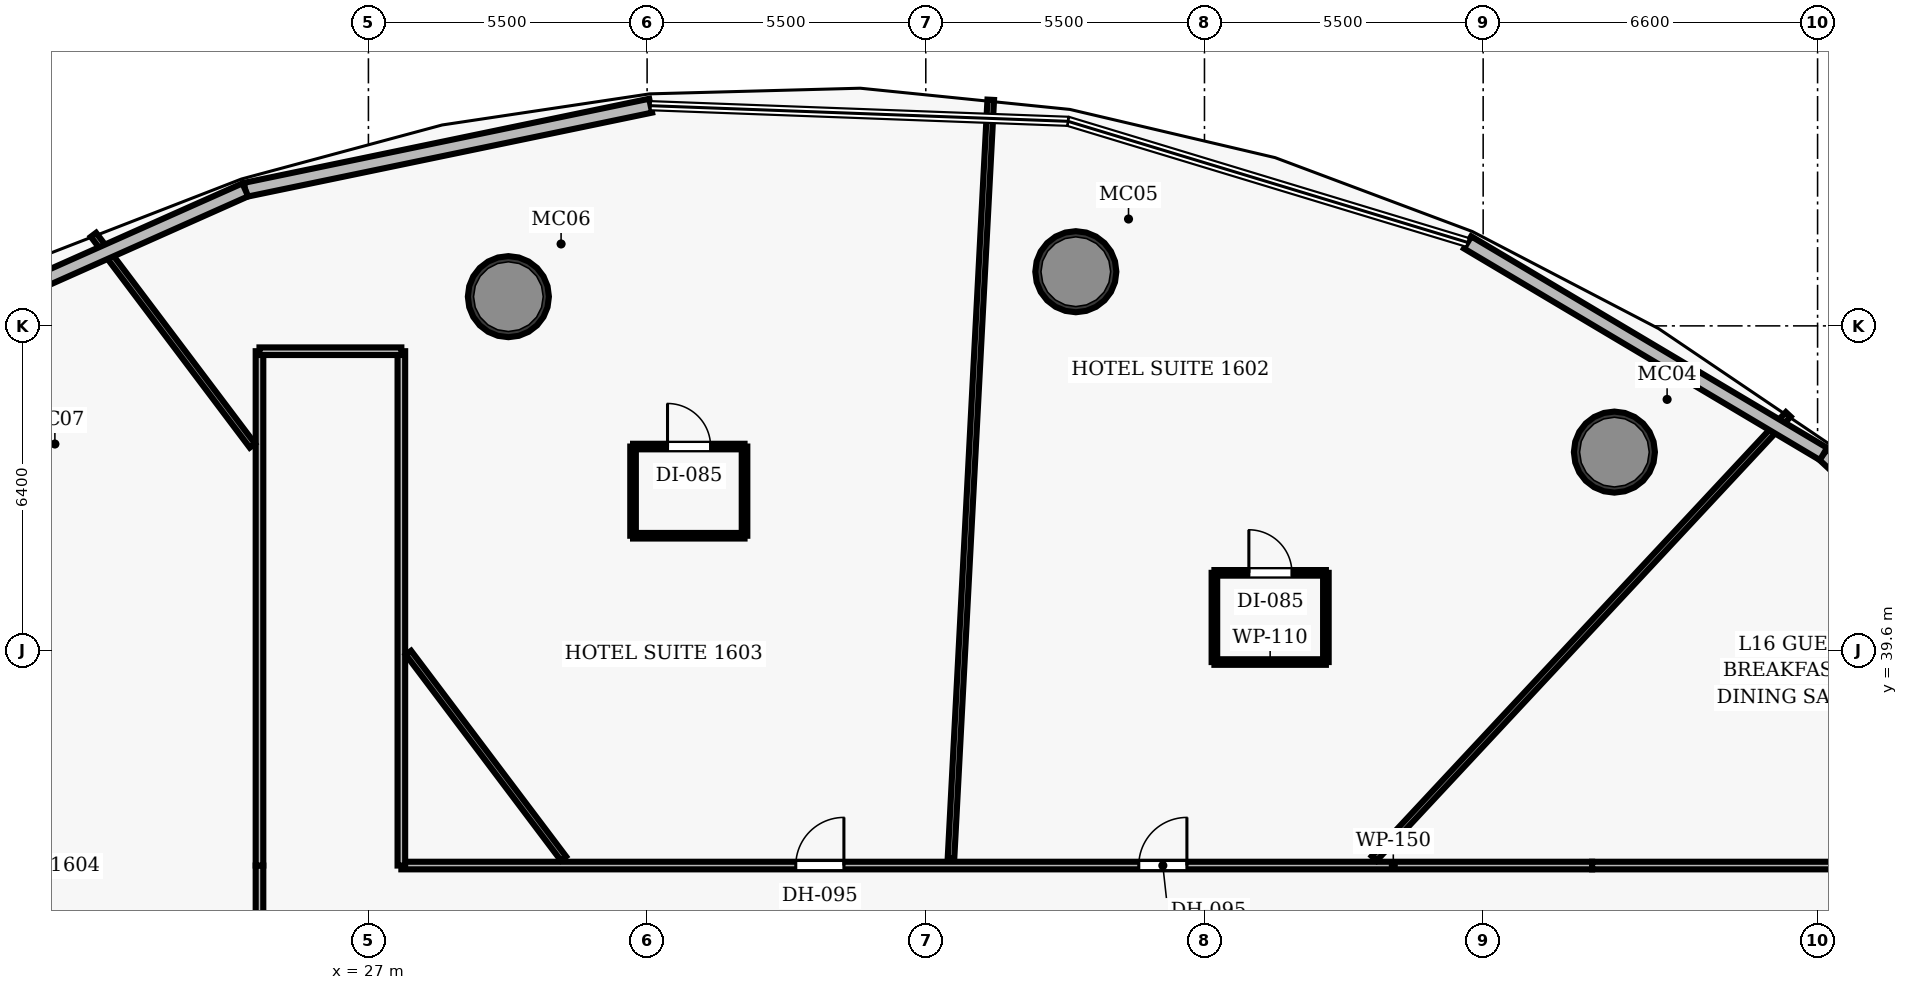
"""IFC4 building model, lengths in metres.
Left out: names, types, materials, properties, quantities, classifications, styles, units other than length and angle.
Written with IfcOpenShell. Run it as: python <this file> out.ifc"""

import sys

from ifc_helpers import new_model, si_unit, direction, frame, frame_2d, origin, origin_2d, place, context, subcontext, project, spatial, rectangle, hollow_circle, extrude, element, fill, save


model = new_model("IFC4")
c1 = context("Model", 3, precision=1e-05, world=origin(), true_north=direction((0.0, 1.0)))
c2 = subcontext(c1, "Body", "Model", "MODEL_VIEW")
j1 = project(units=[si_unit("LENGTHUNIT", "METRE"), si_unit("PLANEANGLEUNIT", "RADIAN")], contexts=[c1])
p1 = place(None, origin())
s1 = spatial("IfcSite", under=j1, at=p1, CompositionType="ELEMENT")
p2 = place(p1, origin())
s2 = spatial("IfcBuilding", under=s1, at=p2, CompositionType="ELEMENT")
p3 = place(p2, frame((0.0, 0.0, 72.9)))
s3 = spatial("IfcBuildingStorey", under=s2, at=p3, CompositionType="ELEMENT", Elevation=72.9)
for number, where, z_axis, x_axis in (
    (1, (51.59, 43.509, 0.0), (0.0, 0.0, 1.0), (1.0, 0.0, 0.0)),
    (2, (40.961, 47.069, 0.0), (0.0, 0.0, 1.0), (1.0, 0.0, 0.0)),
    (3, (29.762, 46.577, 0.0), (0.0, 0.0, 1.0), (1.0, 0.0, 0.0)),
):
    element("IfcColumn", number, at=place(p3, frame(where, z_axis=z_axis, x_axis=x_axis)), inside=s3, PredefinedType="COLUMN", context=c2, shape_type="SweptSolid", body=[
        extrude(hollow_circle(Radius=0.8, WallThickness=0.06, at=origin_2d()), origin(), (0.0, 0.0, 1.0), 3.5),
    ])
p4 = place(p3, frame((27.65, 35.35, 0.0), z_axis=(0.0, 0.0, 1.0), x_axis=(1.0, 0.0, 0.0)))
e4 = element("IfcWall", 4, at=p4, inside=s3, PredefinedType="PARTITIONING", context=c2, shape_type="SweptSolid", body=[
    extrude(rectangle(XDim=23.5, YDim=0.15, at=frame_2d((11.75, 0.0))), origin(), (0.0, 0.0, 1.0), 2.6),
])
p5 = place(p4, frame((14.553, 0.0, 0.0)))
e5 = element("IfcOpeningElement", 5, at=p5, cuts=e4, PredefinedType="OPENING", context=c2, shape_type="SweptSolid", body=[
    extrude(rectangle(XDim=0.95, YDim=2.15, at=frame_2d((0.475, 1.075))), frame((0.0, 0.085, 0.0), z_axis=(0.0, -1.0, 0.0), x_axis=(1.0, 0.0, 0.0)), (0.0, 0.0, 1.0), 0.17),
])
p6 = place(p4, frame((7.784, 0.0, 0.0)))
e6 = element("IfcOpeningElement", 6, at=p6, cuts=e4, PredefinedType="OPENING", context=c2, shape_type="SweptSolid", body=[
    extrude(rectangle(XDim=0.95, YDim=2.15, at=frame_2d((0.475, 1.075))), frame((0.0, 0.085, 0.0), z_axis=(0.0, -1.0, 0.0), x_axis=(1.0, 0.0, 0.0)), (0.0, 0.0, 1.0), 0.17),
])
p7 = place(p3, frame((24.85, 19.45, 0.0), z_axis=(0.0, 0.0, 1.0), x_axis=(0.0, 1.0, 0.0)))
e7 = element("IfcWall", 7, at=p7, inside=s3, PredefinedType="PARTITIONING", context=c2, shape_type="SweptSolid", body=[
    extrude(rectangle(XDim=15.9, YDim=0.15, at=frame_2d((7.95, 0.0))), origin(), (0.0, 0.0, 1.0), 2.6),
])
p8 = place(p7, frame((10.488, 0.0, 0.0)))
e8 = element("IfcOpeningElement", 8, at=p8, cuts=e7, PredefinedType="OPENING", context=c2, shape_type="SweptSolid", body=[
    extrude(rectangle(XDim=0.95, YDim=2.15, at=frame_2d((0.475, 1.075))), frame((0.0, 0.085, 0.0), z_axis=(0.0, -1.0, 0.0), x_axis=(1.0, 0.0, 0.0)), (0.0, 0.0, 1.0), 0.17),
])
p9 = place(p7, frame((6.958, 0.0, 0.0)))
e9 = element("IfcOpeningElement", 9, at=p9, cuts=e7, PredefinedType="OPENING", context=c2, shape_type="SweptSolid", body=[
    extrude(rectangle(XDim=0.95, YDim=2.15, at=frame_2d((0.475, 1.075))), frame((0.0, 0.085, 0.0), z_axis=(0.0, -1.0, 0.0), x_axis=(1.0, 0.0, 0.0)), (0.0, 0.0, 1.0), 0.17),
])
p10 = place(p3, frame((51.15, 35.35, 0.0), z_axis=(0.0, 0.0, 1.0), x_axis=(1.0, 0.0, 0.0)))
e10 = element("IfcWall", 10, at=p10, inside=s3, PredefinedType="PARTITIONING", context=c2, shape_type="SweptSolid", body=[
    extrude(rectangle(XDim=11.606, YDim=0.15, at=frame_2d((5.803, 0.0))), origin(), (0.0, 0.0, 1.0), 2.6),
])
for number, where, z_axis, x_axis in (
    (11, (24.85, 35.35, 0.0), (0.0, 0.0, 1.0), (0.0, 1.0, 0.0)),
    (12, (27.65, 35.35, 0.0), (0.0, 0.0, 1.0), (0.0, 1.0, 0.0)),
):
    element("IfcWall", number, at=place(p3, frame(where, z_axis=z_axis, x_axis=x_axis)), inside=s3, PredefinedType="PARTITIONING", context=c2, shape_type="SweptSolid", body=[
        extrude(rectangle(XDim=10.15, YDim=0.15, at=frame_2d((5.075, 0.0))), origin(), (0.0, 0.0, 1.0), 2.6),
    ])
p11 = place(p3, frame((24.85, 45.5, 0.0), z_axis=(0.0, 0.0, 1.0), x_axis=(1.0, 0.0, 0.0)))
e13 = element("IfcWall", 13, at=p11, inside=s3, PredefinedType="PARTITIONING", context=c2, shape_type="SweptSolid", body=[
    extrude(rectangle(XDim=2.8, YDim=0.15, at=frame_2d((1.4, 0.0))), origin(), (0.0, 0.0, 1.0), 2.6),
])
p12 = place(p3, frame((46.85, 35.49, 0.0), z_axis=(0.0, 0.0, 1.0), x_axis=(0.682000932275, 0.731351302983, 0.0)))
e14 = element("IfcWall", 14, at=p12, inside=s3, PredefinedType="PARTITIONING", context=c2, shape_type="SweptSolid", body=[
    extrude(rectangle(XDim=11.982, YDim=0.13, at=frame_2d((5.991, 0.0))), origin(), (0.0, 0.0, 1.0), 2.6),
])
p13 = place(p3, frame((38.497, 35.49, 0.0), z_axis=(0.0, 0.0, 1.0), x_axis=(0.052337465479, 0.998629455658, 0.0)))
e15 = element("IfcWall", 15, at=p13, inside=s3, PredefinedType="PARTITIONING", context=c2, shape_type="SweptSolid", body=[
    extrude(rectangle(XDim=14.992, YDim=0.13, at=frame_2d((7.496, 0.0))), origin(), (0.0, 0.0, 1.0), 2.6),
])
p14 = place(p3, frame((30.849, 35.49, 0.0), z_axis=(0.0, 0.0, 1.0), x_axis=(-0.601827595562, 0.798626035902, 0.0)))
e16 = element("IfcWall", 16, at=p14, inside=s3, PredefinedType="PARTITIONING", context=c2, shape_type="SweptSolid", body=[
    extrude(rectangle(XDim=5.083, YDim=0.13, at=frame_2d((2.541, 0.0))), origin(), (0.0, 0.0, 1.0), 2.6),
])
p15 = place(p3, frame((24.71, 43.636, 0.0), z_axis=(0.0, 0.0, 1.0), x_axis=(-0.601805197405, 0.798642914184, 0.0)))
e17 = element("IfcWall", 17, at=p15, inside=s3, PredefinedType="PARTITIONING", context=c2, shape_type="SweptSolid", body=[
    extrude(rectangle(XDim=5.21, YDim=0.13, at=frame_2d((2.605, 0.0))), origin(), (0.0, 0.0, 1.0), 2.6),
])
p16 = place(p3, frame((43.696, 39.366, 0.0), z_axis=(0.0, 0.0, 1.0), x_axis=(1.0, 0.0, 0.0)))
e18 = element("IfcWall", 18, at=p16, inside=s3, PredefinedType="PARTITIONING", context=c2, shape_type="SweptSolid", body=[
    extrude(rectangle(XDim=2.2, YDim=0.11, at=frame_2d((1.1, 0.0))), origin(), (0.0, 0.0, 1.0), 2.6),
])
p17 = place(p3, frame((43.696, 41.126, 0.0), z_axis=(0.0, 0.0, 1.0), x_axis=(1.0, 0.0, 0.0)))
e19 = element("IfcWall", 19, at=p17, inside=s3, PredefinedType="PARTITIONING", context=c2, shape_type="SweptSolid", body=[
    extrude(rectangle(XDim=2.2, YDim=0.11, at=frame_2d((1.1, 0.0))), origin(), (0.0, 0.0, 1.0), 2.6),
])
p18 = place(p17, frame((0.68, 0.0, 0.0)))
e20 = element("IfcOpeningElement", 20, at=p18, cuts=e19, PredefinedType="OPENING", context=c2, shape_type="SweptSolid", body=[
    extrude(rectangle(XDim=0.85, YDim=2.1, at=frame_2d((0.425, 1.05))), frame((0.0, 0.065, 0.0), z_axis=(0.0, -1.0, 0.0), x_axis=(1.0, 0.0, 0.0)), (0.0, 0.0, 1.0), 0.13),
])
for number, where, z_axis, x_axis in (
    (21, (43.696, 39.366, 0.0), (0.0, 0.0, 1.0), (0.0, 1.0, 0.0)),
    (22, (45.896, 39.366, 0.0), (0.0, 0.0, 1.0), (0.0, 1.0, 0.0)),
):
    element("IfcWall", number, at=place(p3, frame(where, z_axis=z_axis, x_axis=x_axis)), inside=s3, PredefinedType="PARTITIONING", context=c2, shape_type="SweptSolid", body=[
        extrude(rectangle(XDim=1.76, YDim=0.11, at=frame_2d((0.88, 0.0))), origin(), (0.0, 0.0, 1.0), 2.6),
    ])
p19 = place(p3, frame((32.223, 41.859, 0.0), z_axis=(0.0, 0.0, 1.0), x_axis=(1.0, 0.0, 0.0)))
e23 = element("IfcWall", 23, at=p19, inside=s3, PredefinedType="PARTITIONING", context=c2, shape_type="SweptSolid", body=[
    extrude(rectangle(XDim=2.2, YDim=0.11, at=frame_2d((1.1, 0.0))), origin(), (0.0, 0.0, 1.0), 2.6),
])
p20 = place(p3, frame((32.223, 43.619, 0.0), z_axis=(0.0, 0.0, 1.0), x_axis=(1.0, 0.0, 0.0)))
e24 = element("IfcWall", 24, at=p20, inside=s3, PredefinedType="PARTITIONING", context=c2, shape_type="SweptSolid", body=[
    extrude(rectangle(XDim=2.2, YDim=0.11, at=frame_2d((1.1, 0.0))), origin(), (0.0, 0.0, 1.0), 2.6),
])
p21 = place(p20, frame((0.68, 0.0, 0.0)))
e25 = element("IfcOpeningElement", 25, at=p21, cuts=e24, PredefinedType="OPENING", context=c2, shape_type="SweptSolid", body=[
    extrude(rectangle(XDim=0.85, YDim=2.1, at=frame_2d((0.425, 1.05))), frame((0.0, 0.065, 0.0), z_axis=(0.0, -1.0, 0.0), x_axis=(1.0, 0.0, 0.0)), (0.0, 0.0, 1.0), 0.13),
])
for number, where, z_axis, x_axis in (
    (26, (32.223, 41.859, 0.0), (0.0, 0.0, 1.0), (0.0, 1.0, 0.0)),
    (27, (34.423, 41.859, 0.0), (0.0, 0.0, 1.0), (0.0, 1.0, 0.0)),
):
    element("IfcWall", number, at=place(p3, frame(where, z_axis=z_axis, x_axis=x_axis)), inside=s3, PredefinedType="PARTITIONING", context=c2, shape_type="SweptSolid", body=[
        extrude(rectangle(XDim=1.76, YDim=0.11, at=frame_2d((0.88, 0.0))), origin(), (0.0, 0.0, 1.0), 2.6),
    ])
p22 = place(p3, frame((55.717, 43.472, 0.0), z_axis=(0.0, 0.0, 1.0), x_axis=(0.731145300825, -0.682221774119, 0.0)))
e28 = element("IfcWall", 28, at=p22, inside=s3, PredefinedType="SOLIDWALL", context=c2, shape_type="SweptSolid", body=[
    extrude(rectangle(XDim=7.845, YDim=0.28, at=frame_2d((3.922, 0.0))), origin(), (0.0, 0.0, 1.0), 3.25),
])
p23 = place(p3, frame((48.693, 47.647, 0.0), z_axis=(0.0, 0.0, 1.0), x_axis=(0.859613214245, -0.510945321825, 0.0)))
e29 = element("IfcWall", 29, at=p23, inside=s3, PredefinedType="SOLIDWALL", context=c2, shape_type="SweptSolid", body=[
    extrude(rectangle(XDim=8.171, YDim=0.28, at=frame_2d((4.085, 0.0))), origin(), (0.0, 0.0, 1.0), 3.25),
])
p24 = place(p3, frame((24.57, 48.685, 0.0), z_axis=(0.0, 0.0, 1.0), x_axis=(0.979128564845, 0.203241859626, 0.0)))
e30 = element("IfcWall", 30, at=p24, inside=s3, PredefinedType="SOLIDWALL", context=c2, shape_type="SweptSolid", body=[
    extrude(rectangle(XDim=8.171, YDim=0.28, at=frame_2d((4.085, 0.0))), origin(), (0.0, 0.0, 1.0), 3.25),
])
p25 = place(p3, frame((17.404, 45.492, 0.0), z_axis=(0.0, 0.0, 1.0), x_axis=(0.913423554357, 0.407010331989, 0.0)))
e31 = element("IfcWall", 31, at=p25, inside=s3, PredefinedType="SOLIDWALL", context=c2, shape_type="SweptSolid", body=[
    extrude(rectangle(XDim=7.845, YDim=0.28, at=frame_2d((3.922, 0.0))), origin(), (0.0, 0.0, 1.0), 3.25),
])
p26 = place(p5, origin())
e32 = element("IfcDoor", 32, at=p26, inside=s3, OperationType="SINGLE_SWING_RIGHT", PredefinedType="DOOR", context=c2, shape_type="SweptSolid", body=[
    extrude(rectangle(XDim=0.95, YDim=2.15, at=frame_2d((0.475, 1.075))), frame((0.0, 0.025, 0.0), z_axis=(0.0, -1.0, 0.0), x_axis=(1.0, 0.0, 0.0)), (0.0, 0.0, 1.0), 0.05),
])
fill(e5, e32)
p27 = place(p18, origin())
e33 = element("IfcDoor", 33, at=p27, inside=s3, OperationType="SINGLE_SWING_LEFT", PredefinedType="DOOR", context=c2, shape_type="SweptSolid", body=[
    extrude(rectangle(XDim=0.85, YDim=2.1, at=frame_2d((0.425, 1.05))), frame((0.0, 0.025, 0.0), z_axis=(0.0, -1.0, 0.0), x_axis=(1.0, 0.0, 0.0)), (0.0, 0.0, 1.0), 0.05),
])
fill(e20, e33)
p28 = place(p6, origin())
e34 = element("IfcDoor", 34, at=p28, inside=s3, OperationType="SINGLE_SWING_RIGHT", PredefinedType="DOOR", context=c2, shape_type="SweptSolid", body=[
    extrude(rectangle(XDim=0.95, YDim=2.15, at=frame_2d((0.475, 1.075))), frame((0.0, 0.025, 0.0), z_axis=(0.0, -1.0, 0.0), x_axis=(1.0, 0.0, 0.0)), (0.0, 0.0, 1.0), 0.05),
])
fill(e6, e34)
p29 = place(p21, origin())
e35 = element("IfcDoor", 35, at=p29, inside=s3, OperationType="SINGLE_SWING_LEFT", PredefinedType="DOOR", context=c2, shape_type="SweptSolid", body=[
    extrude(rectangle(XDim=0.85, YDim=2.1, at=frame_2d((0.425, 1.05))), frame((0.0, 0.025, 0.0), z_axis=(0.0, -1.0, 0.0), x_axis=(1.0, 0.0, 0.0)), (0.0, 0.0, 1.0), 0.05),
])
fill(e25, e35)
save(model, sys.argv[1])
